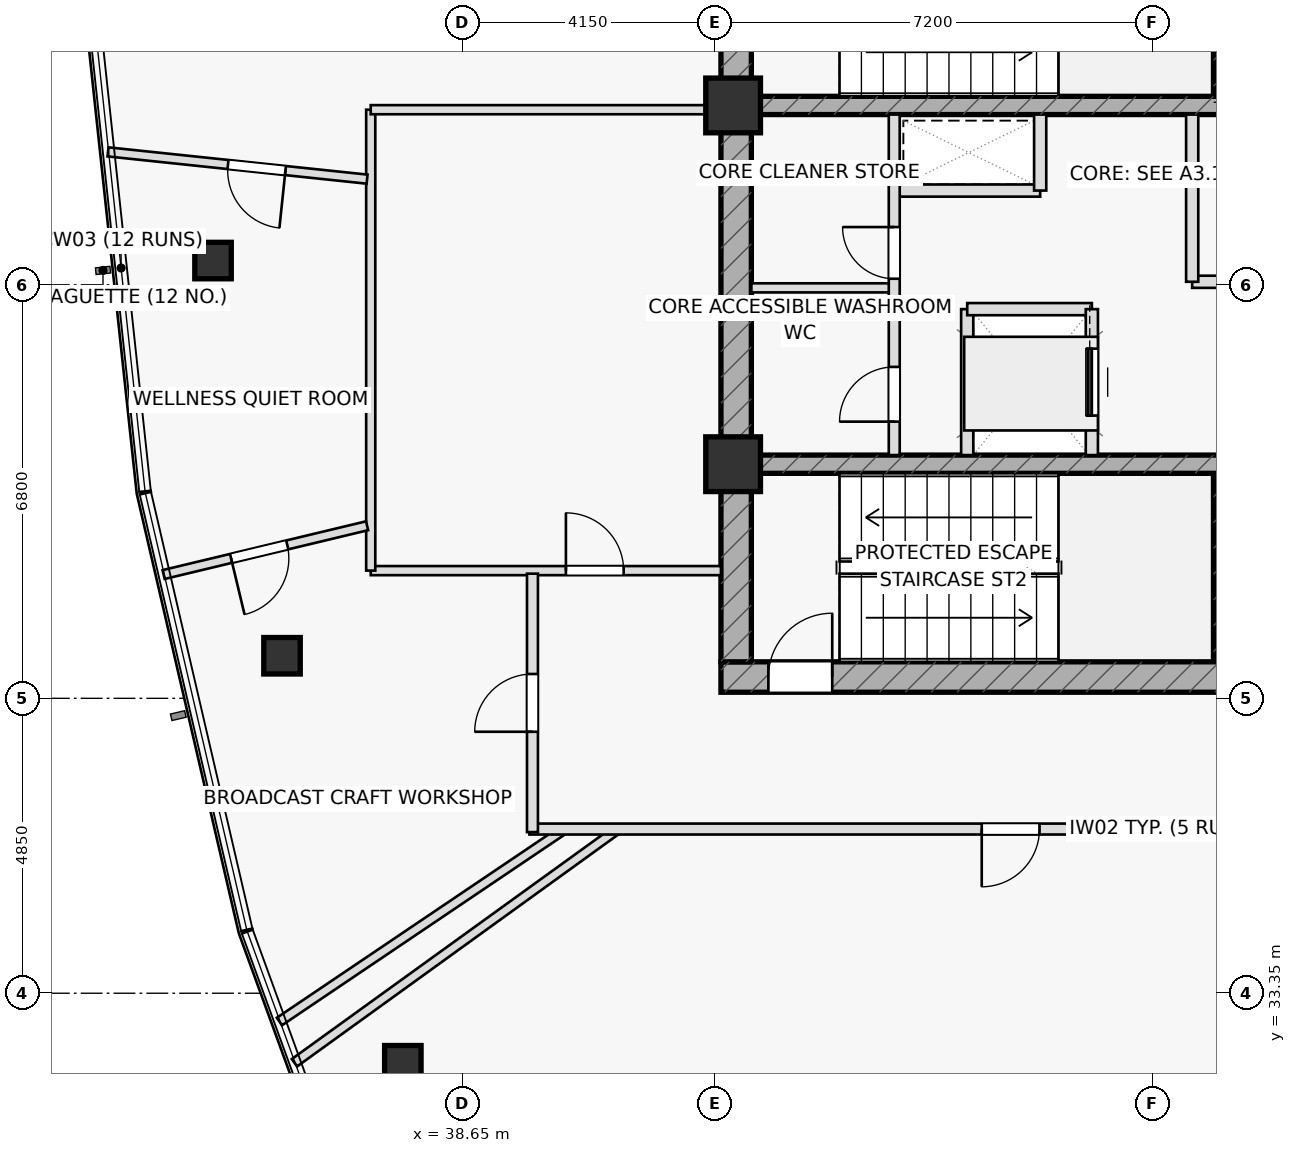
"""IFC4 building model, lengths in metres.
Left out: names, types, materials, properties, quantities, classifications, styles, units other than length and angle.
Written with IfcOpenShell. Run it as: python <this file> out.ifc"""

import sys

from ifc_helpers import new_model, si_unit, direction, frame, frame_2d, origin, origin_2d, place, context, subcontext, project, spatial, rectangle, hollow_rectangle, extrude, element, fill, save


model = new_model("IFC4")
c1 = context("Model", 3, precision=1e-05, world=origin(), true_north=direction((0.0, 1.0)))
c2 = subcontext(c1, "Body", "Model", "MODEL_VIEW")
j1 = project(units=[si_unit("LENGTHUNIT", "METRE"), si_unit("PLANEANGLEUNIT", "RADIAN")], contexts=[c1])
p1 = place(None, origin())
s1 = spatial("IfcSite", under=j1, at=p1, CompositionType="ELEMENT")
p2 = place(p1, origin())
s2 = spatial("IfcBuilding", under=s1, at=p2, CompositionType="ELEMENT")
p3 = place(p2, frame((0.0, 0.0, 200.3)))
s3 = spatial("IfcBuildingStorey", under=s2, at=p3, CompositionType="ELEMENT", Elevation=200.3)
for number, where, z_axis, x_axis in (
    (1, (51.11, 48.1, 0.0), (0.0, 0.0, 1.0), (0.0, 1.0, 0.0)),
    (2, (51.11, 38.8, 0.0), (0.0, 0.0, 1.0), (0.0, 1.0, 0.0)),
):
    element("IfcWall", number, at=place(p3, frame(where, z_axis=z_axis, x_axis=x_axis)), inside=s3, PredefinedType="SHEAR", context=c2, shape_type="SweptSolid", body=[
        extrude(rectangle(XDim=3.1, YDim=0.22, at=frame_2d((1.55, 0.0))), origin(), (0.0, 0.0, 1.0), 3.55),
    ])
p4 = place(p3, frame((42.9, 38.55, 0.0), z_axis=(0.0, 0.0, 1.0), x_axis=(1.0, 0.0, 0.0)))
e3 = element("IfcWall", 3, at=p4, inside=s3, PredefinedType="SHEAR", context=c2, shape_type="SweptSolid", body=[
    extrude(rectangle(XDim=14.2, YDim=0.5, at=frame_2d((7.1, 0.0))), origin(), (0.0, 0.0, 1.0), 3.55),
])
p5 = place(p4, frame((0.78, 0.0, 0.0)))
e4 = element("IfcOpeningElement", 4, at=p5, cuts=e3, PredefinedType="OPENING", context=c2, shape_type="SweptSolid", body=[
    extrude(rectangle(XDim=1.05, YDim=2.2, at=frame_2d((0.525, 1.1))), frame((0.0, 0.26, 0.0), z_axis=(0.0, -1.0, 0.0), x_axis=(1.0, 0.0, 0.0)), (0.0, 0.0, 1.0), 0.52),
])
p6 = place(p3, frame((43.15, 38.8, 0.0), z_axis=(0.0, 0.0, 1.0), x_axis=(0.0, 1.0, 0.0)))
e5 = element("IfcWall", 5, at=p6, inside=s3, PredefinedType="SHEAR", context=c2, shape_type="SweptSolid", body=[
    extrude(rectangle(XDim=12.4, YDim=0.5, at=frame_2d((6.2, 0.0))), origin(), (0.0, 0.0, 1.0), 3.55),
])
p7 = place(p3, frame((43.4, 47.95, 0.0), z_axis=(0.0, 0.0, 1.0), x_axis=(1.0, 0.0, 0.0)))
e6 = element("IfcWall", 6, at=p7, inside=s3, PredefinedType="SHEAR", context=c2, shape_type="SweptSolid", body=[
    extrude(rectangle(XDim=13.2, YDim=0.3, at=frame_2d((6.6, 0.0))), origin(), (0.0, 0.0, 1.0), 3.55),
])
p8 = place(p7, frame((8.345, 0.0, 0.0)))
e7 = element("IfcOpeningElement", 7, at=p8, cuts=e6, PredefinedType="OPENING", context=c2, shape_type="SweptSolid", body=[
    extrude(rectangle(XDim=1.15, YDim=2.2, at=frame_2d((0.575, 1.1))), frame((0.0, 0.16, 0.0), z_axis=(0.0, -1.0, 0.0), x_axis=(1.0, 0.0, 0.0)), (0.0, 0.0, 1.0), 0.32),
])
p9 = place(p7, frame((10.065, 0.0, 0.0)))
e8 = element("IfcOpeningElement", 8, at=p9, cuts=e6, PredefinedType="OPENING", context=c2, shape_type="SweptSolid", body=[
    extrude(rectangle(XDim=1.15, YDim=2.2, at=frame_2d((0.575, 1.1))), frame((0.0, 0.16, 0.0), z_axis=(0.0, -1.0, 0.0), x_axis=(1.0, 0.0, 0.0)), (0.0, 0.0, 1.0), 0.32),
])
p10 = place(p7, frame((11.645, 0.0, 0.0)))
e9 = element("IfcOpeningElement", 9, at=p10, cuts=e6, PredefinedType="OPENING", context=c2, shape_type="SweptSolid", body=[
    extrude(rectangle(XDim=1.15, YDim=2.2, at=frame_2d((0.575, 1.1))), frame((0.0, 0.16, 0.0), z_axis=(0.0, -1.0, 0.0), x_axis=(1.0, 0.0, 0.0)), (0.0, 0.0, 1.0), 0.32),
])
p11 = place(p3, frame((43.4, 42.05, 0.0), z_axis=(0.0, 0.0, 1.0), x_axis=(1.0, 0.0, 0.0)))
e10 = element("IfcWall", 10, at=p11, inside=s3, PredefinedType="SHEAR", context=c2, shape_type="SweptSolid", body=[
    extrude(rectangle(XDim=13.2, YDim=0.3, at=frame_2d((6.6, 0.0))), origin(), (0.0, 0.0, 1.0), 3.55),
])
p12 = place(p11, frame((8.37, 0.0, 0.0)))
e11 = element("IfcOpeningElement", 11, at=p12, cuts=e10, PredefinedType="OPENING", context=c2, shape_type="SweptSolid", body=[
    extrude(rectangle(XDim=1.1, YDim=2.15, at=frame_2d((0.55, 1.075))), frame((0.0, 0.16, 0.0), z_axis=(0.0, -1.0, 0.0), x_axis=(1.0, 0.0, 0.0)), (0.0, 0.0, 1.0), 0.32),
])
p13 = place(p11, frame((10.09, 0.0, 0.0)))
e12 = element("IfcOpeningElement", 12, at=p13, cuts=e10, PredefinedType="OPENING", context=c2, shape_type="SweptSolid", body=[
    extrude(rectangle(XDim=1.1, YDim=2.15, at=frame_2d((0.55, 1.075))), frame((0.0, 0.16, 0.0), z_axis=(0.0, -1.0, 0.0), x_axis=(1.0, 0.0, 0.0)), (0.0, 0.0, 1.0), 0.32),
])
p14 = place(p11, frame((11.83, 0.0, 0.0)))
e13 = element("IfcOpeningElement", 13, at=p14, cuts=e10, PredefinedType="OPENING", context=c2, shape_type="SweptSolid", body=[
    extrude(rectangle(XDim=1.1, YDim=2.15, at=frame_2d((0.55, 1.075))), frame((0.0, 0.16, 0.0), z_axis=(0.0, -1.0, 0.0), x_axis=(1.0, 0.0, 0.0)), (0.0, 0.0, 1.0), 0.32),
])
for number, where, z_axis, x_axis in (
    (14, (43.1, 47.95, 0.0), (0.0, 0.0, 1.0), (1.0, 0.0, 0.0)),
    (15, (43.1, 42.05, 0.0), (0.0, 0.0, 1.0), (1.0, 0.0, 0.0)),
):
    element("IfcColumn", number, at=place(p3, frame(where, z_axis=z_axis, x_axis=x_axis)), inside=s3, PredefinedType="COLUMN", context=c2, shape_type="SweptSolid", body=[
        extrude(rectangle(XDim=0.9, YDim=0.9, at=origin_2d()), origin(), (0.0, 0.0, 1.0), 3.55),
    ])
for number, where, z_axis, x_axis in (
    (16, (34.546, 45.399, 0.0), (0.0, 0.0, 1.0), (1.0, 0.0, 0.0)),
    (17, (35.681, 38.9, 0.0), (0.0, 0.0, 1.0), (1.0, 0.0, 0.0)),
    (18, (37.668, 32.19, 0.0), (0.0, 0.0, 1.0), (1.0, 0.0, 0.0)),
):
    element("IfcColumn", number, at=place(p3, frame(where, z_axis=z_axis, x_axis=x_axis)), inside=s3, PredefinedType="COLUMN", context=c2, shape_type="SweptSolid", body=[
        extrude(hollow_rectangle(XDim=0.6, YDim=0.6, WallThickness=0.036, at=origin_2d()), origin(), (0.0, 0.0, 1.0), 3.55),
    ])
p15 = place(p3, frame((45.75, 46.55, 0.0), z_axis=(0.0, 0.0, 1.0), x_axis=(1.0, 0.0, 0.0)))
e19 = element("IfcWall", 19, at=p15, inside=s3, PredefinedType="PARTITIONING", context=c2, shape_type="SweptSolid", body=[
    extrude(rectangle(XDim=2.4, YDim=0.2, at=frame_2d((1.2, 0.0))), origin(), (0.0, 0.0, 1.0), 3.55),
])
p16 = place(p3, frame((48.15, 46.55, 0.0), z_axis=(0.0, 0.0, 1.0), x_axis=(0.0, 1.0, 0.0)))
e20 = element("IfcWall", 20, at=p16, inside=s3, PredefinedType="PARTITIONING", context=c2, shape_type="SweptSolid", body=[
    extrude(rectangle(XDim=1.25, YDim=0.2, at=frame_2d((0.625, 0.0))), origin(), (0.0, 0.0, 1.0), 3.55),
])
p17 = place(p3, frame((46.95, 42.2, 0.0), z_axis=(0.0, 0.0, 1.0), x_axis=(0.0, 1.0, 0.0)))
e21 = element("IfcWall", 21, at=p17, inside=s3, PredefinedType="PARTITIONING", context=c2, shape_type="SweptSolid", body=[
    extrude(rectangle(XDim=2.4, YDim=0.2, at=frame_2d((1.2, 0.0))), origin(), (0.0, 0.0, 1.0), 3.55),
])
p18 = place(p3, frame((46.95, 44.6, 0.0), z_axis=(0.0, 0.0, 1.0), x_axis=(1.0, 0.0, 0.0)))
e22 = element("IfcWall", 22, at=p18, inside=s3, PredefinedType="PARTITIONING", context=c2, shape_type="SweptSolid", body=[
    extrude(rectangle(XDim=2.05, YDim=0.2, at=frame_2d((1.025, 0.0))), origin(), (0.0, 0.0, 1.0), 3.55),
])
p19 = place(p3, frame((50.65, 45.05, 0.0), z_axis=(0.0, 0.0, 1.0), x_axis=(1.0, 0.0, 0.0)))
e23 = element("IfcWall", 23, at=p19, inside=s3, PredefinedType="PARTITIONING", context=c2, shape_type="SweptSolid", body=[
    extrude(rectangle(XDim=5.95, YDim=0.2, at=frame_2d((2.975, 0.0))), origin(), (0.0, 0.0, 1.0), 3.55),
])
p20 = place(p19, frame((1.35, 0.0, 0.0)))
e24 = element("IfcOpeningElement", 24, at=p20, cuts=e23, PredefinedType="OPENING", context=c2, shape_type="SweptSolid", body=[
    extrude(rectangle(XDim=1.5, YDim=2.2, at=frame_2d((0.75, 1.1))), frame((0.0, 0.11, 0.0), z_axis=(0.0, -1.0, 0.0), x_axis=(1.0, 0.0, 0.0)), (0.0, 0.0, 1.0), 0.22),
])
p21 = place(p3, frame((50.65, 45.05, 0.0), z_axis=(0.0, 0.0, 1.0), x_axis=(0.0, 1.0, 0.0)))
e25 = element("IfcWall", 25, at=p21, inside=s3, PredefinedType="PARTITIONING", context=c2, shape_type="SweptSolid", body=[
    extrude(rectangle(XDim=2.75, YDim=0.2, at=frame_2d((1.375, 0.0))), origin(), (0.0, 0.0, 1.0), 3.55),
])
p22 = place(p3, frame((43.4, 44.95, 0.0), z_axis=(0.0, 0.0, 1.0), x_axis=(1.0, 0.0, 0.0)))
e26 = element("IfcWall", 26, at=p22, inside=s3, PredefinedType="PARTITIONING", context=c2, shape_type="SweptSolid", body=[
    extrude(rectangle(XDim=2.35, YDim=0.15, at=frame_2d((1.175, 0.0))), origin(), (0.0, 0.0, 1.0), 3.55),
])
p23 = place(p3, frame((45.75, 42.2, 0.0), z_axis=(0.0, 0.0, 1.0), x_axis=(0.0, 1.0, 0.0)))
e27 = element("IfcWall", 27, at=p23, inside=s3, PredefinedType="PARTITIONING", context=c2, shape_type="SweptSolid", body=[
    extrude(rectangle(XDim=5.6, YDim=0.18, at=frame_2d((2.8, 0.0))), origin(), (0.0, 0.0, 1.0), 3.55),
])
p24 = place(p23, frame((0.55, 0.0, 0.0)))
e28 = element("IfcOpeningElement", 28, at=p24, cuts=e27, PredefinedType="OPENING", context=c2, shape_type="SweptSolid", body=[
    extrude(rectangle(XDim=0.9, YDim=2.05, at=frame_2d((0.45, 1.025))), frame((0.0, 0.1, 0.0), z_axis=(0.0, -1.0, 0.0), x_axis=(1.0, 0.0, 0.0)), (0.0, 0.0, 1.0), 0.2),
])
p25 = place(p23, frame((2.9, 0.0, 0.0)))
e29 = element("IfcOpeningElement", 29, at=p25, cuts=e27, PredefinedType="OPENING", context=c2, shape_type="SweptSolid", body=[
    extrude(rectangle(XDim=0.85, YDim=2.05, at=frame_2d((0.425, 1.025))), frame((0.0, 0.1, 0.0), z_axis=(0.0, -1.0, 0.0), x_axis=(1.0, 0.0, 0.0)), (0.0, 0.0, 1.0), 0.2),
])
p26 = place(p3, frame((37.14, 40.3, 0.0), z_axis=(0.0, 0.0, 1.0), x_axis=(1.0, 0.0, 0.0)))
e30 = element("IfcWall", 30, at=p26, inside=s3, PredefinedType="PARTITIONING", context=c2, shape_type="SweptSolid", body=[
    extrude(rectangle(XDim=5.76, YDim=0.15, at=frame_2d((2.88, 0.0))), origin(), (0.0, 0.0, 1.0), 3.55),
])
p27 = place(p26, frame((3.21, 0.0, 0.0)))
e31 = element("IfcOpeningElement", 31, at=p27, cuts=e30, PredefinedType="OPENING", context=c2, shape_type="SweptSolid", body=[
    extrude(rectangle(XDim=0.95, YDim=2.05, at=frame_2d((0.475, 1.025))), frame((0.0, 0.085, 0.0), z_axis=(0.0, -1.0, 0.0), x_axis=(1.0, 0.0, 0.0)), (0.0, 0.0, 1.0), 0.17),
])
p28 = place(p3, frame((37.14, 40.3, 0.0), z_axis=(0.0, 0.0, 1.0), x_axis=(0.0, 1.0, 0.0)))
e32 = element("IfcWall", 32, at=p28, inside=s3, PredefinedType="PARTITIONING", context=c2, shape_type="SweptSolid", body=[
    extrude(rectangle(XDim=7.58, YDim=0.15, at=frame_2d((3.79, 0.0))), origin(), (0.0, 0.0, 1.0), 2.935),
])
p29 = place(p3, frame((37.14, 47.88, 0.0), z_axis=(0.0, 0.0, 1.0), x_axis=(1.0, 0.0, 0.0)))
e33 = element("IfcWall", 33, at=p29, inside=s3, PredefinedType="PARTITIONING", context=c2, shape_type="SweptSolid", body=[
    extrude(rectangle(XDim=5.76, YDim=0.15, at=frame_2d((2.88, 0.0))), origin(), (0.0, 0.0, 1.0), 2.935),
])
p30 = place(p3, frame((40.331, 36.05, 0.0), z_axis=(0.0, 0.0, 1.0), x_axis=(-0.829032137796, -0.559200960748, 0.0)))
e34 = element("IfcWall", 34, at=p30, inside=s3, PredefinedType="PARTITIONING", context=c2, shape_type="SweptSolid", body=[
    extrude(rectangle(XDim=5.66, YDim=0.15, at=frame_2d((2.83, 0.0))), origin(), (0.0, 0.0, 1.0), 3.025),
])
p31 = place(p3, frame((41.207, 36.05, 0.0), z_axis=(0.0, 0.0, 1.0), x_axis=(-0.810696880717, -0.585466111398, 0.0)))
e35 = element("IfcWall", 35, at=p31, inside=s3, PredefinedType="PARTITIONING", context=c2, shape_type="SweptSolid", body=[
    extrude(rectangle(XDim=6.564, YDim=0.15, at=frame_2d((3.282, 0.0))), origin(), (0.0, 0.0, 1.0), 2.935),
])
p32 = place(p3, frame((37.08, 46.738, 0.0), z_axis=(0.0, 0.0, 1.0), x_axis=(-0.994511696143, 0.104625456917, 0.0)))
e36 = element("IfcWall", 36, at=p32, inside=s3, PredefinedType="PARTITIONING", context=c2, shape_type="SweptSolid", body=[
    extrude(rectangle(XDim=4.284, YDim=0.15, at=frame_2d((2.142, 0.0))), origin(), (0.0, 0.0, 1.0), 2.935),
])
p33 = place(p32, frame((1.35, 0.0, 0.0)))
e37 = element("IfcOpeningElement", 37, at=p33, cuts=e36, PredefinedType="OPENING", context=c2, shape_type="SweptSolid", body=[
    extrude(rectangle(XDim=0.95, YDim=2.05, at=frame_2d((0.475, 1.025))), frame((0.0, 0.085, 0.0), z_axis=(0.0, -1.0, 0.0), x_axis=(1.0, 0.0, 0.0)), (0.0, 0.0, 1.0), 0.17),
])
p34 = place(p3, frame((37.08, 41.038, 0.0), z_axis=(0.0, 0.0, 1.0), x_axis=(-0.972422714039, -0.233225352867, 0.0)))
e38 = element("IfcWall", 38, at=p34, inside=s3, PredefinedType="PARTITIONING", context=c2, shape_type="SweptSolid", body=[
    extrude(rectangle(XDim=3.441, YDim=0.15, at=frame_2d((1.72, 0.0))), origin(), (0.0, 0.0, 1.0), 3.025),
])
p35 = place(p34, frame((1.35, 0.0, 0.0)))
e39 = element("IfcOpeningElement", 39, at=p35, cuts=e38, PredefinedType="OPENING", context=c2, shape_type="SweptSolid", body=[
    extrude(rectangle(XDim=0.95, YDim=2.05, at=frame_2d((0.475, 1.025))), frame((0.0, 0.085, 0.0), z_axis=(0.0, -1.0, 0.0), x_axis=(1.0, 0.0, 0.0)), (0.0, 0.0, 1.0), 0.17),
])
p36 = place(p3, frame((59.4, 36.05, 0.0), z_axis=(0.0, 0.0, 1.0), x_axis=(-1.0, 0.0, 0.0)))
e40 = element("IfcWall", 40, at=p36, inside=s3, PredefinedType="PARTITIONING", context=c2, shape_type="SweptSolid", body=[
    extrude(rectangle(XDim=19.65, YDim=0.18, at=frame_2d((9.825, 0.0))), origin(), (0.0, 0.0, 1.0), 2.935),
])
p37 = place(p36, frame((2.805, 0.0, 0.0)))
e41 = element("IfcOpeningElement", 41, at=p37, cuts=e40, PredefinedType="OPENING", context=c2, shape_type="SweptSolid", body=[
    extrude(rectangle(XDim=0.95, YDim=2.05, at=frame_2d((0.475, 1.025))), frame((0.0, 0.1, 0.0), z_axis=(0.0, -1.0, 0.0), x_axis=(1.0, 0.0, 0.0)), (0.0, 0.0, 1.0), 0.2),
])
p38 = place(p36, frame((11.261, 0.0, 0.0)))
e42 = element("IfcOpeningElement", 42, at=p38, cuts=e40, PredefinedType="OPENING", context=c2, shape_type="SweptSolid", body=[
    extrude(rectangle(XDim=0.95, YDim=2.05, at=frame_2d((0.475, 1.025))), frame((0.0, 0.1, 0.0), z_axis=(0.0, -1.0, 0.0), x_axis=(1.0, 0.0, 0.0)), (0.0, 0.0, 1.0), 0.2),
])
p39 = place(p3, frame((39.8, 36.0, 0.0), z_axis=(0.0, 0.0, 1.0), x_axis=(0.0, 1.0, 0.0)))
e43 = element("IfcWall", 43, at=p39, inside=s3, PredefinedType="PARTITIONING", context=c2, shape_type="SweptSolid", body=[
    extrude(rectangle(XDim=4.25, YDim=0.18, at=frame_2d((2.125, 0.0))), origin(), (0.0, 0.0, 1.0), 2.935),
])
p40 = place(p39, frame((1.65, 0.0, 0.0)))
e44 = element("IfcOpeningElement", 44, at=p40, cuts=e43, PredefinedType="OPENING", context=c2, shape_type="SweptSolid", body=[
    extrude(rectangle(XDim=0.95, YDim=2.05, at=frame_2d((0.475, 1.025))), frame((0.0, 0.1, 0.0), z_axis=(0.0, -1.0, 0.0), x_axis=(1.0, 0.0, 0.0)), (0.0, 0.0, 1.0), 0.2),
])
p41 = place(p3, frame((49.0, 42.2, 0.0), z_axis=(0.0, 0.0, 1.0), x_axis=(0.0, 1.0, 0.0)))
e45 = element("IfcWall", 45, at=p41, inside=s3, PredefinedType="PARTITIONING", context=c2, shape_type="SweptSolid", body=[
    extrude(rectangle(XDim=2.4, YDim=0.2, at=frame_2d((1.2, 0.0))), origin(), (0.0, 0.0, 1.0), 3.55),
])
p42 = place(p41, frame((0.65, 0.0, 0.0)))
e46 = element("IfcOpeningElement", 46, at=p42, cuts=e45, PredefinedType="OPENING", context=c2, shape_type="SweptSolid", body=[
    extrude(rectangle(XDim=1.1, YDim=2.15, at=frame_2d((0.55, 1.075))), frame((0.0, 0.11, 0.0), z_axis=(0.0, -1.0, 0.0), x_axis=(1.0, 0.0, 0.0)), (0.0, 0.0, 1.0), 0.22),
])
p43 = place(p5, origin())
e47 = element("IfcDoor", 47, at=p43, inside=s3, OperationType="SINGLE_SWING_RIGHT", PredefinedType="DOOR", context=c2, shape_type="SweptSolid", body=[
    extrude(rectangle(XDim=1.05, YDim=2.2, at=frame_2d((0.525, 1.1))), frame((0.0, 0.025, 0.0), z_axis=(0.0, -1.0, 0.0), x_axis=(1.0, 0.0, 0.0)), (0.0, 0.0, 1.0), 0.05),
])
fill(e4, e47)
p44 = place(p24, origin())
e48 = element("IfcDoor", 48, at=p44, inside=s3, OperationType="SINGLE_SWING_LEFT", PredefinedType="DOOR", context=c2, shape_type="SweptSolid", body=[
    extrude(rectangle(XDim=0.9, YDim=2.05, at=frame_2d((0.45, 1.025))), frame((0.0, 0.025, 0.0), z_axis=(0.0, -1.0, 0.0), x_axis=(1.0, 0.0, 0.0)), (0.0, 0.0, 1.0), 0.05),
])
fill(e28, e48)
p45 = place(p25, origin())
e49 = element("IfcDoor", 49, at=p45, inside=s3, OperationType="SINGLE_SWING_RIGHT", PredefinedType="DOOR", context=c2, shape_type="SweptSolid", body=[
    extrude(rectangle(XDim=0.85, YDim=2.05, at=frame_2d((0.425, 1.025))), frame((0.0, 0.025, 0.0), z_axis=(0.0, -1.0, 0.0), x_axis=(1.0, 0.0, 0.0)), (0.0, 0.0, 1.0), 0.05),
])
fill(e29, e49)
p46 = place(p27, origin())
e50 = element("IfcDoor", 50, at=p46, inside=s3, OperationType="SINGLE_SWING_LEFT", PredefinedType="DOOR", context=c2, shape_type="SweptSolid", body=[
    extrude(rectangle(XDim=0.95, YDim=2.05, at=frame_2d((0.475, 1.025))), frame((0.0, 0.025, 0.0), z_axis=(0.0, -1.0, 0.0), x_axis=(1.0, 0.0, 0.0)), (0.0, 0.0, 1.0), 0.05),
])
fill(e31, e50)
p47 = place(p33, origin())
e51 = element("IfcDoor", 51, at=p47, inside=s3, OperationType="SINGLE_SWING_LEFT", PredefinedType="DOOR", context=c2, shape_type="SweptSolid", body=[
    extrude(rectangle(XDim=0.95, YDim=2.05, at=frame_2d((0.475, 1.025))), frame((0.0, 0.025, 0.0), z_axis=(0.0, -1.0, 0.0), x_axis=(1.0, 0.0, 0.0)), (0.0, 0.0, 1.0), 0.05),
])
fill(e37, e51)
p48 = place(p35, origin())
e52 = element("IfcDoor", 52, at=p48, inside=s3, OperationType="SINGLE_SWING_RIGHT", PredefinedType="DOOR", context=c2, shape_type="SweptSolid", body=[
    extrude(rectangle(XDim=0.95, YDim=2.05, at=frame_2d((0.475, 1.025))), frame((0.0, 0.025, 0.0), z_axis=(0.0, -1.0, 0.0), x_axis=(1.0, 0.0, 0.0)), (0.0, 0.0, 1.0), 0.05),
])
fill(e39, e52)
p49 = place(p38, origin())
e53 = element("IfcDoor", 53, at=p49, inside=s3, OperationType="SINGLE_SWING_RIGHT", PredefinedType="DOOR", context=c2, shape_type="SweptSolid", body=[
    extrude(rectangle(XDim=0.95, YDim=2.05, at=frame_2d((0.475, 1.025))), frame((0.0, 0.025, 0.0), z_axis=(0.0, -1.0, 0.0), x_axis=(1.0, 0.0, 0.0)), (0.0, 0.0, 1.0), 0.05),
])
fill(e42, e53)
p50 = place(p40, origin())
e54 = element("IfcDoor", 54, at=p50, inside=s3, OperationType="SINGLE_SWING_LEFT", PredefinedType="DOOR", context=c2, shape_type="SweptSolid", body=[
    extrude(rectangle(XDim=0.95, YDim=2.05, at=frame_2d((0.475, 1.025))), frame((0.0, 0.025, 0.0), z_axis=(0.0, -1.0, 0.0), x_axis=(1.0, 0.0, 0.0)), (0.0, 0.0, 1.0), 0.05),
])
fill(e44, e54)
p51 = place(p42, origin())
e55 = element("IfcDoor", 55, at=p51, inside=s3, OperationType="SLIDING_TO_RIGHT", PredefinedType="DOOR", context=c2, shape_type="SweptSolid", body=[
    extrude(rectangle(XDim=1.1, YDim=2.15, at=frame_2d((0.55, 1.075))), frame((0.0, 0.025, 0.0), z_axis=(0.0, -1.0, 0.0), x_axis=(1.0, 0.0, 0.0)), (0.0, 0.0, 1.0), 0.05),
])
fill(e46, e55)
save(model, sys.argv[1])
